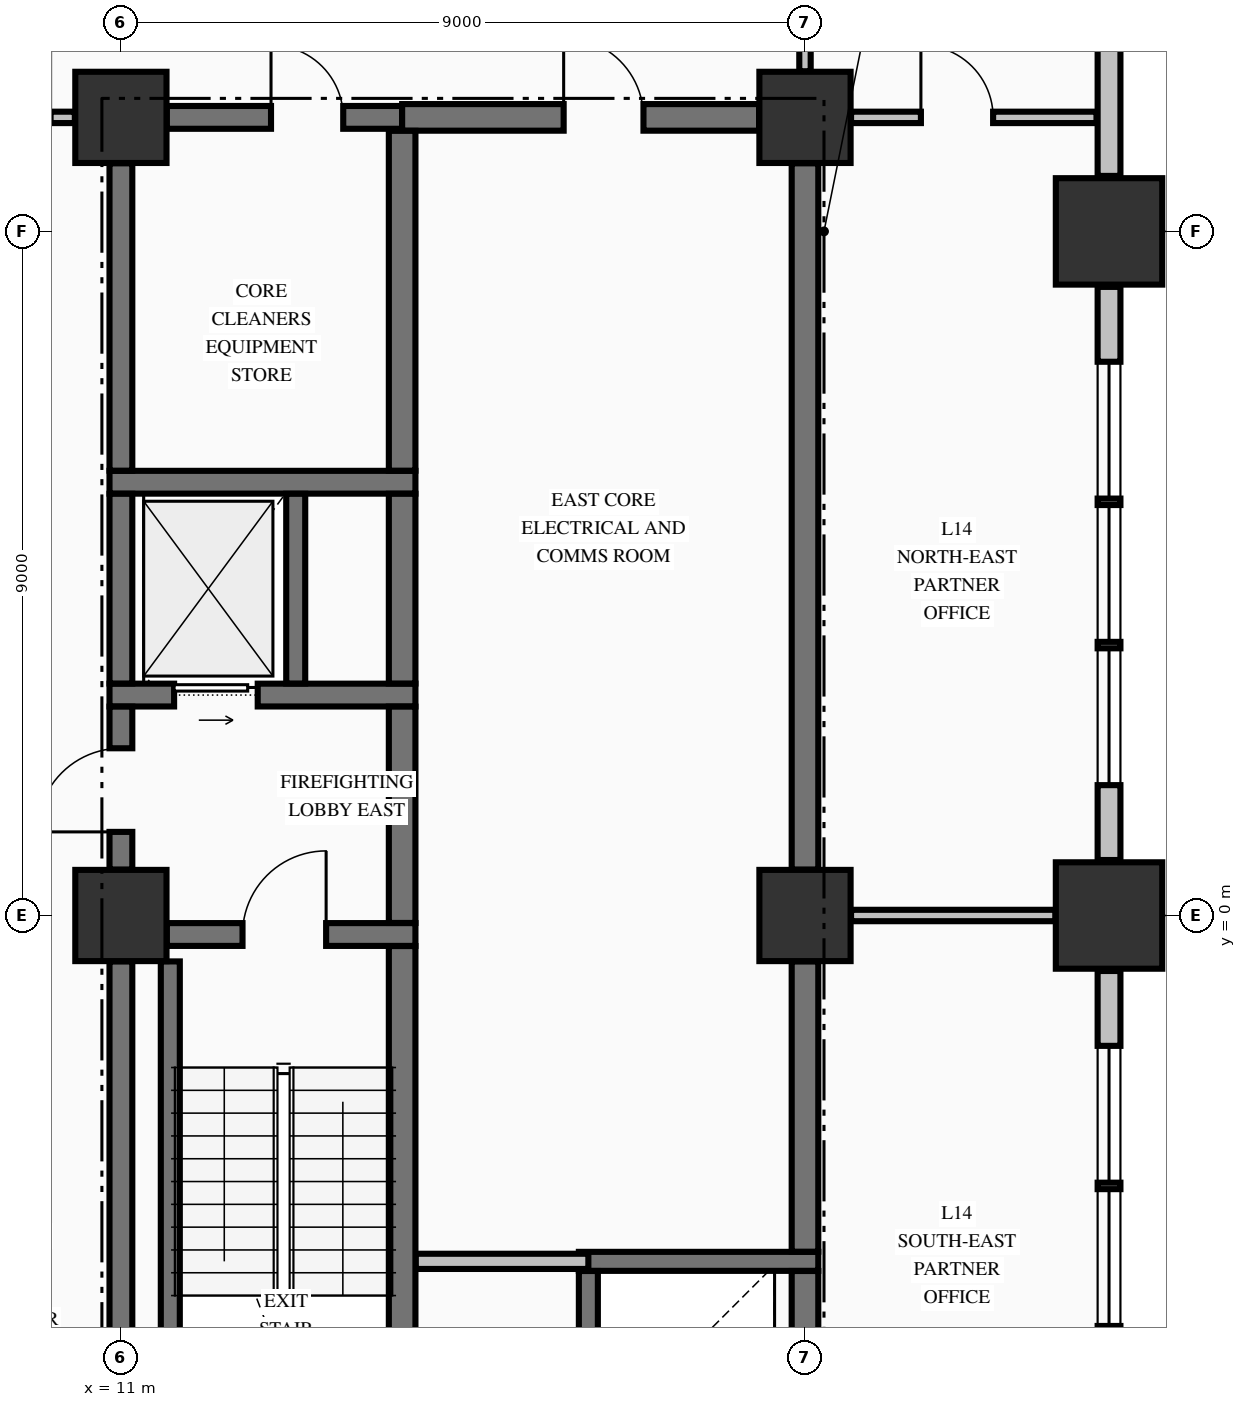
"""IFC4 building model, lengths in metres.
Left out: names, types, materials, properties, quantities, classifications, styles, units other than length and angle.
Written with IfcOpenShell. Run it as: python <this file> out.ifc"""

import sys

from ifc_helpers import new_model, si_unit, direction, frame, frame_2d, origin, origin_2d, place, context, subcontext, project, spatial, rectangle, extrude, element, fill, save


model = new_model("IFC4")
c1 = context("Model", 3, precision=1e-05, world=origin(), true_north=direction((0.0, 1.0)))
c2 = subcontext(c1, "Body", "Model", "MODEL_VIEW")
j1 = project(units=[si_unit("LENGTHUNIT", "METRE"), si_unit("PLANEANGLEUNIT", "RADIAN")], contexts=[c1])
p1 = place(None, origin())
s1 = spatial("IfcSite", under=j1, at=p1, CompositionType="ELEMENT")
p2 = place(p1, origin())
s2 = spatial("IfcBuilding", under=s1, at=p2, CompositionType="ELEMENT")
p3 = place(p2, frame((0.0, 0.0, 60.76)))
s3 = spatial("IfcBuildingStorey", under=s2, at=p3, CompositionType="ELEMENT", Elevation=60.76)
for number, where, z_axis, x_axis in (
    (1, (24.0, 0.0, -0.3), (0.0, 0.0, 1.0), (1.0, 0.0, 0.0)),
    (2, (24.0, 9.0, -0.3), (0.0, 0.0, 1.0), (1.0, 0.0, 0.0)),
):
    element("IfcColumn", number, at=place(p3, frame(where, z_axis=z_axis, x_axis=x_axis)), inside=s3, PredefinedType="COLUMN", context=c2, shape_type="SweptSolid", body=[
        extrude(rectangle(XDim=1.4, YDim=1.4, at=origin_2d()), origin(), (0.0, 0.0, 1.0), 3.62),
    ])
for number, where, z_axis, x_axis in (
    (3, (11.0, 0.0, -0.3), (0.0, 0.0, 1.0), (1.0, 0.0, 0.0)),
    (4, (11.0, 10.5, -0.3), (0.0, 0.0, 1.0), (1.0, 0.0, 0.0)),
    (5, (20.0, 10.5, -0.3), (0.0, 0.0, 1.0), (1.0, 0.0, 0.0)),
    (6, (20.0, 0.0, -0.3), (0.0, 0.0, 1.0), (1.0, 0.0, 0.0)),
):
    element("IfcColumn", number, at=place(p3, frame(where, z_axis=z_axis, x_axis=x_axis)), inside=s3, PredefinedType="COLUMN", context=c2, shape_type="SweptSolid", body=[
        extrude(rectangle(XDim=1.2, YDim=1.2, at=origin_2d()), origin(), (0.0, 0.0, 1.0), 3.62),
    ])
p4 = place(p3, frame((24.0, -8.27, 0.0), z_axis=(0.0, 0.0, 1.0), x_axis=(0.0, 1.0, 0.0)))
e7 = element("IfcWall", 7, at=p4, inside=s3, PredefinedType="STANDARD", context=c2, shape_type="SweptSolid", body=[
    extrude(rectangle(XDim=7.54, YDim=0.3, at=frame_2d((3.77, 0.0))), origin(), (0.0, 0.0, 1.0), 2.712),
])
p5 = place(p4, frame((0.985, 0.0, 0.78)))
e8 = element("IfcOpeningElement", 8, at=p5, cuts=e7, PredefinedType="OPENING", context=c2, shape_type="SweptSolid", body=[
    extrude(rectangle(XDim=1.8, YDim=1.72, at=frame_2d((0.9, 0.86))), frame((0.0, 0.16, 0.0), z_axis=(0.0, -1.0, 0.0), x_axis=(1.0, 0.0, 0.0)), (0.0, 0.0, 1.0), 0.32),
])
p6 = place(p4, frame((2.87, 0.0, 0.78)))
e9 = element("IfcOpeningElement", 9, at=p6, cuts=e7, PredefinedType="OPENING", context=c2, shape_type="SweptSolid", body=[
    extrude(rectangle(XDim=1.8, YDim=1.72, at=frame_2d((0.9, 0.86))), frame((0.0, 0.16, 0.0), z_axis=(0.0, -1.0, 0.0), x_axis=(1.0, 0.0, 0.0)), (0.0, 0.0, 1.0), 0.32),
])
p7 = place(p4, frame((4.755, 0.0, 0.78)))
e10 = element("IfcOpeningElement", 10, at=p7, cuts=e7, PredefinedType="OPENING", context=c2, shape_type="SweptSolid", body=[
    extrude(rectangle(XDim=1.8, YDim=1.72, at=frame_2d((0.9, 0.86))), frame((0.0, 0.16, 0.0), z_axis=(0.0, -1.0, 0.0), x_axis=(1.0, 0.0, 0.0)), (0.0, 0.0, 1.0), 0.32),
])
p8 = place(p3, frame((24.0, 0.73, 0.0), z_axis=(0.0, 0.0, 1.0), x_axis=(0.0, 1.0, 0.0)))
e11 = element("IfcWall", 11, at=p8, inside=s3, PredefinedType="STANDARD", context=c2, shape_type="SweptSolid", body=[
    extrude(rectangle(XDim=7.54, YDim=0.3, at=frame_2d((3.77, 0.0))), origin(), (0.0, 0.0, 1.0), 2.712),
])
p9 = place(p8, frame((0.985, 0.0, 0.78)))
e12 = element("IfcOpeningElement", 12, at=p9, cuts=e11, PredefinedType="OPENING", context=c2, shape_type="SweptSolid", body=[
    extrude(rectangle(XDim=1.8, YDim=1.72, at=frame_2d((0.9, 0.86))), frame((0.0, 0.16, 0.0), z_axis=(0.0, -1.0, 0.0), x_axis=(1.0, 0.0, 0.0)), (0.0, 0.0, 1.0), 0.32),
])
p10 = place(p8, frame((2.87, 0.0, 0.78)))
e13 = element("IfcOpeningElement", 13, at=p10, cuts=e11, PredefinedType="OPENING", context=c2, shape_type="SweptSolid", body=[
    extrude(rectangle(XDim=1.8, YDim=1.72, at=frame_2d((0.9, 0.86))), frame((0.0, 0.16, 0.0), z_axis=(0.0, -1.0, 0.0), x_axis=(1.0, 0.0, 0.0)), (0.0, 0.0, 1.0), 0.32),
])
p11 = place(p8, frame((4.755, 0.0, 0.78)))
e14 = element("IfcOpeningElement", 14, at=p11, cuts=e11, PredefinedType="OPENING", context=c2, shape_type="SweptSolid", body=[
    extrude(rectangle(XDim=1.8, YDim=1.72, at=frame_2d((0.9, 0.86))), frame((0.0, 0.16, 0.0), z_axis=(0.0, -1.0, 0.0), x_axis=(1.0, 0.0, 0.0)), (0.0, 0.0, 1.0), 0.32),
])
p12 = place(p3, frame((24.0, 9.73, 0.0), z_axis=(0.0, 0.0, 1.0), x_axis=(0.0, 1.0, 0.0)))
e15 = element("IfcWall", 15, at=p12, inside=s3, PredefinedType="STANDARD", context=c2, shape_type="SweptSolid", body=[
    extrude(rectangle(XDim=12.54, YDim=0.3, at=frame_2d((6.27, 0.0))), origin(), (0.0, 0.0, 1.0), 2.712),
])
p13 = place(p3, frame((17.025, -4.55, 0.0), z_axis=(0.0, 0.0, 1.0), x_axis=(1.0, 0.0, 0.0)))
e16 = element("IfcWall", 16, at=p13, inside=s3, PredefinedType="SOLIDWALL", context=c2, shape_type="SweptSolid", body=[
    extrude(rectangle(XDim=3.15, YDim=0.25, at=frame_2d((1.575, 0.0))), origin(), (0.0, 0.0, 1.0), 3.32),
])
p14 = place(p3, frame((11.604, -0.25, 0.0), z_axis=(0.0, 0.0, 1.0), x_axis=(1.0, 0.0, 0.0)))
e17 = element("IfcWall", 17, at=p14, inside=s3, PredefinedType="SHEAR", context=c2, shape_type="SweptSolid", body=[
    extrude(rectangle(XDim=3.271, YDim=0.3, at=frame_2d((1.635, 0.0))), origin(), (0.0, 0.0, 1.0), 3.32),
])
p15 = place(p14, frame((0.996, 0.0, 0.0)))
e18 = element("IfcOpeningElement", 18, at=p15, cuts=e17, PredefinedType="OPENING", context=c2, shape_type="SweptSolid", body=[
    extrude(rectangle(XDim=1.1, YDim=2.15, at=frame_2d((0.55, 1.075))), frame((0.0, 0.16, 0.0), z_axis=(0.0, -1.0, 0.0), x_axis=(1.0, 0.0, 0.0)), (0.0, 0.0, 1.0), 0.32),
])
p16 = place(p3, frame((10.85, 2.9, 0.0), z_axis=(0.0, 0.0, 1.0), x_axis=(1.0, 0.0, 0.0)))
e19 = element("IfcWall", 19, at=p16, inside=s3, PredefinedType="SHEAR", context=c2, shape_type="SweptSolid", body=[
    extrude(rectangle(XDim=4.025, YDim=0.3, at=frame_2d((2.012, 0.0))), origin(), (0.0, 0.0, 1.0), 3.32),
])
p17 = place(p16, frame((0.85, 0.0, 0.0)))
e20 = element("IfcOpeningElement", 20, at=p17, cuts=e19, PredefinedType="OPENING", context=c2, shape_type="SweptSolid", body=[
    extrude(rectangle(XDim=1.1, YDim=2.2, at=frame_2d((0.55, 1.1))), frame((0.0, 0.16, 0.0), z_axis=(0.0, -1.0, 0.0), x_axis=(1.0, 0.0, 0.0)), (0.0, 0.0, 1.0), 0.32),
])
p18 = place(p3, frame((10.85, 5.7, 0.0), z_axis=(0.0, 0.0, 1.0), x_axis=(1.0, 0.0, 0.0)))
e21 = element("IfcWall", 21, at=p18, inside=s3, PredefinedType="SHEAR", context=c2, shape_type="SweptSolid", body=[
    extrude(rectangle(XDim=4.025, YDim=0.3, at=frame_2d((2.012, 0.0))), origin(), (0.0, 0.0, 1.0), 3.32),
])
p19 = place(p3, frame((11.604, 10.5, 0.0), z_axis=(0.0, 0.0, 1.0), x_axis=(1.0, 0.0, 0.0)))
e22 = element("IfcWall", 22, at=p19, inside=s3, PredefinedType="SHEAR", context=c2, shape_type="SweptSolid", body=[
    extrude(rectangle(XDim=3.096, YDim=0.3, at=frame_2d((1.548, 0.0))), origin(), (0.0, 0.0, 1.0), 3.32),
])
p20 = place(p19, frame((1.371, 0.0, 0.0)))
e23 = element("IfcOpeningElement", 23, at=p20, cuts=e22, PredefinedType="OPENING", context=c2, shape_type="SweptSolid", body=[
    extrude(rectangle(XDim=0.95, YDim=2.15, at=frame_2d((0.475, 1.075))), frame((0.0, 0.16, 0.0), z_axis=(0.0, -1.0, 0.0), x_axis=(1.0, 0.0, 0.0)), (0.0, 0.0, 1.0), 0.32),
])
p21 = place(p3, frame((14.7, 10.5, 0.0), z_axis=(0.0, 0.0, 1.0), x_axis=(1.0, 0.0, 0.0)))
e24 = element("IfcWall", 24, at=p21, inside=s3, PredefinedType="SHEAR", context=c2, shape_type="SweptSolid", body=[
    extrude(rectangle(XDim=4.696, YDim=0.35, at=frame_2d((2.348, 0.0))), origin(), (0.0, 0.0, 1.0), 3.32),
])
p22 = place(p21, frame((2.125, 0.0, 0.0)))
e25 = element("IfcOpeningElement", 25, at=p22, cuts=e24, PredefinedType="OPENING", context=c2, shape_type="SweptSolid", body=[
    extrude(rectangle(XDim=1.05, YDim=2.15, at=frame_2d((0.525, 1.075))), frame((0.0, 0.185, 0.0), z_axis=(0.0, -1.0, 0.0), x_axis=(1.0, 0.0, 0.0)), (0.0, 0.0, 1.0), 0.37),
])
p23 = place(p3, frame((14.878, -4.55, 0.0), z_axis=(0.0, 0.0, 1.0), x_axis=(1.0, 0.0, 0.0)))
e26 = element("IfcWall", 26, at=p23, inside=s3, PredefinedType="PARTITIONING", context=c2, shape_type="SweptSolid", body=[
    extrude(rectangle(XDim=2.272, YDim=0.2, at=frame_2d((1.136, 0.0))), origin(), (0.0, 0.0, 1.0), 3.32),
])
p24 = place(p3, frame((20.606, 0.0, 0.0), z_axis=(0.0, 0.0, 1.0), x_axis=(1.0, 0.0, 0.0)))
e27 = element("IfcWall", 27, at=p24, inside=s3, PredefinedType="PARTITIONING", context=c2, shape_type="SweptSolid", body=[
    extrude(rectangle(XDim=2.688, YDim=0.15, at=frame_2d((1.344, 0.0))), origin(), (0.0, 0.0, 1.0), 1.512),
])
p25 = place(p3, frame((-10.394, 10.5, 0.0), z_axis=(0.0, 0.0, 1.0), x_axis=(1.0, 0.0, 0.0)))
e28 = element("IfcWall", 28, at=p25, inside=s3, PredefinedType="PARTITIONING", context=c2, shape_type="SweptSolid", body=[
    extrude(rectangle(XDim=20.788, YDim=0.15, at=frame_2d((10.394, 0.0))), origin(), (0.0, 0.0, 1.0), 3.32),
])
p26 = place(p25, frame((0.319, 0.0, 0.0)))
e29 = element("IfcOpeningElement", 29, at=p26, cuts=e28, PredefinedType="OPENING", context=c2, shape_type="SweptSolid", body=[
    extrude(rectangle(XDim=1.05, YDim=2.15, at=frame_2d((0.525, 1.075))), frame((0.0, 0.085, 0.0), z_axis=(0.0, -1.0, 0.0), x_axis=(1.0, 0.0, 0.0)), (0.0, 0.0, 1.0), 0.17),
])
p27 = place(p25, frame((19.419, 0.0, 0.0)))
e30 = element("IfcOpeningElement", 30, at=p27, cuts=e28, PredefinedType="OPENING", context=c2, shape_type="SweptSolid", body=[
    extrude(rectangle(XDim=1.05, YDim=2.15, at=frame_2d((0.525, 1.075))), frame((0.0, 0.085, 0.0), z_axis=(0.0, -1.0, 0.0), x_axis=(1.0, 0.0, 0.0)), (0.0, 0.0, 1.0), 0.17),
])
p28 = place(p3, frame((20.606, 10.5, 0.0), z_axis=(0.0, 0.0, 1.0), x_axis=(1.0, 0.0, 0.0)))
e31 = element("IfcWall", 31, at=p28, inside=s3, PredefinedType="PARTITIONING", context=c2, shape_type="SweptSolid", body=[
    extrude(rectangle(XDim=3.229, YDim=0.15, at=frame_2d((1.615, 0.0))), origin(), (0.0, 0.0, 1.0), 3.32),
])
p29 = place(p28, frame((0.919, 0.0, 0.0)))
e32 = element("IfcOpeningElement", 32, at=p29, cuts=e31, PredefinedType="OPENING", context=c2, shape_type="SweptSolid", body=[
    extrude(rectangle(XDim=0.95, YDim=2.15, at=frame_2d((0.475, 1.075))), frame((0.0, 0.085, 0.0), z_axis=(0.0, -1.0, 0.0), x_axis=(1.0, 0.0, 0.0)), (0.0, 0.0, 1.0), 0.17),
])
p30 = place(p3, frame((11.0, -9.346, 0.0), z_axis=(0.0, 0.0, 1.0), x_axis=(0.0, 1.0, 0.0)))
e33 = element("IfcWall", 33, at=p30, inside=s3, PredefinedType="SHEAR", context=c2, shape_type="SweptSolid", body=[
    extrude(rectangle(XDim=8.742, YDim=0.3, at=frame_2d((4.371, 0.0))), origin(), (0.0, 0.0, 1.0), 3.32),
])
p31 = place(p3, frame((11.0, 0.604, 0.0), z_axis=(0.0, 0.0, 1.0), x_axis=(0.0, 1.0, 0.0)))
e34 = element("IfcWall", 34, at=p31, inside=s3, PredefinedType="SHEAR", context=c2, shape_type="SweptSolid", body=[
    extrude(rectangle(XDim=2.144, YDim=0.3, at=frame_2d((1.072, 0.0))), origin(), (0.0, 0.0, 1.0), 3.32),
])
p32 = place(p31, frame((0.496, 0.0, 0.0)))
e35 = element("IfcOpeningElement", 35, at=p32, cuts=e34, PredefinedType="OPENING", context=c2, shape_type="SweptSolid", body=[
    extrude(rectangle(XDim=1.1, YDim=2.15, at=frame_2d((0.55, 1.075))), frame((0.0, 0.16, 0.0), z_axis=(0.0, -1.0, 0.0), x_axis=(1.0, 0.0, 0.0)), (0.0, 0.0, 1.0), 0.32),
])
p33 = place(p3, frame((11.0, 3.052, 0.0), z_axis=(0.0, 0.0, 1.0), x_axis=(0.0, 1.0, 0.0)))
e36 = element("IfcWall", 36, at=p33, inside=s3, PredefinedType="SHEAR", context=c2, shape_type="SweptSolid", body=[
    extrude(rectangle(XDim=2.496, YDim=0.3, at=frame_2d((1.248, 0.0))), origin(), (0.0, 0.0, 1.0), 3.32),
])
p34 = place(p3, frame((11.0, 5.852, 0.0), z_axis=(0.0, 0.0, 1.0), x_axis=(0.0, 1.0, 0.0)))
e37 = element("IfcWall", 37, at=p34, inside=s3, PredefinedType="SHEAR", context=c2, shape_type="SweptSolid", body=[
    extrude(rectangle(XDim=4.044, YDim=0.3, at=frame_2d((2.022, 0.0))), origin(), (0.0, 0.0, 1.0), 3.32),
])
p35 = place(p3, frame((11.65, -9.346, 0.0), z_axis=(0.0, 0.0, 1.0), x_axis=(0.0, 1.0, 0.0)))
e38 = element("IfcWall", 38, at=p35, inside=s3, PredefinedType="SOLIDWALL", context=c2, shape_type="SweptSolid", body=[
    extrude(rectangle(XDim=8.742, YDim=0.25, at=frame_2d((4.371, 0.0))), origin(), (0.0, 0.0, 1.0), 3.32),
])
p36 = place(p3, frame((13.3, 3.052, 0.0), z_axis=(0.0, 0.0, 1.0), x_axis=(0.0, 1.0, 0.0)))
e39 = element("IfcWall", 39, at=p36, inside=s3, PredefinedType="SOLIDWALL", context=c2, shape_type="SweptSolid", body=[
    extrude(rectangle(XDim=2.496, YDim=0.25, at=frame_2d((1.248, 0.0))), origin(), (0.0, 0.0, 1.0), 3.32),
])
p37 = place(p3, frame((14.7, -9.773, 0.0), z_axis=(0.0, 0.0, 1.0), x_axis=(0.0, 1.0, 0.0)))
e40 = element("IfcWall", 40, at=p37, inside=s3, PredefinedType="SHEAR", context=c2, shape_type="SweptSolid", body=[
    extrude(rectangle(XDim=9.371, YDim=0.35, at=frame_2d((4.686, 0.0))), origin(), (0.0, 0.0, 1.0), 3.32),
])
p38 = place(p3, frame((14.7, -0.098, 0.0), z_axis=(0.0, 0.0, 1.0), x_axis=(0.0, 1.0, 0.0)))
e41 = element("IfcWall", 41, at=p38, inside=s3, PredefinedType="SHEAR", context=c2, shape_type="SweptSolid", body=[
    extrude(rectangle(XDim=2.846, YDim=0.35, at=frame_2d((1.423, 0.0))), origin(), (0.0, 0.0, 1.0), 3.32),
])
p39 = place(p3, frame((14.7, 3.052, 0.0), z_axis=(0.0, 0.0, 1.0), x_axis=(0.0, 1.0, 0.0)))
e42 = element("IfcWall", 42, at=p39, inside=s3, PredefinedType="SHEAR", context=c2, shape_type="SweptSolid", body=[
    extrude(rectangle(XDim=2.496, YDim=0.35, at=frame_2d((1.248, 0.0))), origin(), (0.0, 0.0, 1.0), 3.32),
])
p40 = place(p3, frame((14.7, 5.852, 0.0), z_axis=(0.0, 0.0, 1.0), x_axis=(0.0, 1.0, 0.0)))
e43 = element("IfcWall", 43, at=p40, inside=s3, PredefinedType="SHEAR", context=c2, shape_type="SweptSolid", body=[
    extrude(rectangle(XDim=4.471, YDim=0.35, at=frame_2d((2.235, 0.0))), origin(), (0.0, 0.0, 1.0), 3.32),
])
p41 = place(p3, frame((17.15, -6.923, 0.0), z_axis=(0.0, 0.0, 1.0), x_axis=(0.0, 1.0, 0.0)))
e44 = element("IfcWall", 44, at=p41, inside=s3, PredefinedType="SOLIDWALL", context=c2, shape_type="SweptSolid", body=[
    extrude(rectangle(XDim=2.246, YDim=0.25, at=frame_2d((1.123, 0.0))), origin(), (0.0, 0.0, 1.0), 3.32),
])
p42 = place(p3, frame((20.0, -6.923, 0.0), z_axis=(0.0, 0.0, 1.0), x_axis=(0.0, 1.0, 0.0)))
e45 = element("IfcWall", 45, at=p42, inside=s3, PredefinedType="SHEAR", context=c2, shape_type="SweptSolid", body=[
    extrude(rectangle(XDim=2.246, YDim=0.35, at=frame_2d((1.123, 0.0))), origin(), (0.0, 0.0, 1.0), 3.32),
])
p43 = place(p3, frame((20.0, -4.423, 0.0), z_axis=(0.0, 0.0, 1.0), x_axis=(0.0, 1.0, 0.0)))
e46 = element("IfcWall", 46, at=p43, inside=s3, PredefinedType="SHEAR", context=c2, shape_type="SweptSolid", body=[
    extrude(rectangle(XDim=3.819, YDim=0.35, at=frame_2d((1.91, 0.0))), origin(), (0.0, 0.0, 1.0), 3.32),
])
p44 = place(p3, frame((20.0, 0.604, 0.0), z_axis=(0.0, 0.0, 1.0), x_axis=(0.0, 1.0, 0.0)))
e47 = element("IfcWall", 47, at=p44, inside=s3, PredefinedType="SHEAR", context=c2, shape_type="SweptSolid", body=[
    extrude(rectangle(XDim=9.292, YDim=0.35, at=frame_2d((4.646, 0.0))), origin(), (0.0, 0.0, 1.0), 3.32),
])
p45 = place(p3, frame((20.0, 11.106, 0.0), z_axis=(0.0, 0.0, 1.0), x_axis=(0.0, 1.0, 0.0)))
e48 = element("IfcWall", 48, at=p45, inside=s3, PredefinedType="PARTITIONING", context=c2, shape_type="SweptSolid", body=[
    extrude(rectangle(XDim=2.366, YDim=0.15, at=frame_2d((1.183, 0.0))), origin(), (0.0, 0.0, 1.0), 3.32),
])
p46 = place(p45, frame((0.449, 0.0, 0.0)))
e49 = element("IfcOpeningElement", 49, at=p46, cuts=e48, PredefinedType="OPENING", context=c2, shape_type="SweptSolid", body=[
    extrude(rectangle(XDim=0.95, YDim=2.15, at=frame_2d((0.475, 1.075))), frame((0.0, 0.085, 0.0), z_axis=(0.0, -1.0, 0.0), x_axis=(1.0, 0.0, 0.0)), (0.0, 0.0, 1.0), 0.17),
])
p47 = place(p6, origin())
e50 = element("IfcWindow", 50, at=p47, inside=s3, PartitioningType="SINGLE_PANEL", PredefinedType="WINDOW", context=c2, shape_type="SweptSolid", body=[
    extrude(rectangle(XDim=1.8, YDim=1.72, at=frame_2d((0.9, 0.86))), frame((0.0, 0.03, 0.0), z_axis=(0.0, -1.0, 0.0), x_axis=(1.0, 0.0, 0.0)), (0.0, 0.0, 1.0), 0.06),
])
fill(e9, e50)
p48 = place(p7, origin())
e51 = element("IfcWindow", 51, at=p48, inside=s3, PartitioningType="SINGLE_PANEL", PredefinedType="WINDOW", context=c2, shape_type="SweptSolid", body=[
    extrude(rectangle(XDim=1.8, YDim=1.72, at=frame_2d((0.9, 0.86))), frame((0.0, 0.03, 0.0), z_axis=(0.0, -1.0, 0.0), x_axis=(1.0, 0.0, 0.0)), (0.0, 0.0, 1.0), 0.06),
])
fill(e10, e51)
p49 = place(p9, origin())
e52 = element("IfcWindow", 52, at=p49, inside=s3, PartitioningType="SINGLE_PANEL", PredefinedType="WINDOW", context=c2, shape_type="SweptSolid", body=[
    extrude(rectangle(XDim=1.8, YDim=1.72, at=frame_2d((0.9, 0.86))), frame((0.0, 0.03, 0.0), z_axis=(0.0, -1.0, 0.0), x_axis=(1.0, 0.0, 0.0)), (0.0, 0.0, 1.0), 0.06),
])
fill(e12, e52)
p50 = place(p10, origin())
e53 = element("IfcWindow", 53, at=p50, inside=s3, PartitioningType="SINGLE_PANEL", PredefinedType="WINDOW", context=c2, shape_type="SweptSolid", body=[
    extrude(rectangle(XDim=1.8, YDim=1.72, at=frame_2d((0.9, 0.86))), frame((0.0, 0.03, 0.0), z_axis=(0.0, -1.0, 0.0), x_axis=(1.0, 0.0, 0.0)), (0.0, 0.0, 1.0), 0.06),
])
fill(e13, e53)
p51 = place(p11, origin())
e54 = element("IfcWindow", 54, at=p51, inside=s3, PartitioningType="SINGLE_PANEL", PredefinedType="WINDOW", context=c2, shape_type="SweptSolid", body=[
    extrude(rectangle(XDim=1.8, YDim=1.72, at=frame_2d((0.9, 0.86))), frame((0.0, 0.03, 0.0), z_axis=(0.0, -1.0, 0.0), x_axis=(1.0, 0.0, 0.0)), (0.0, 0.0, 1.0), 0.06),
])
fill(e14, e54)
p52 = place(p15, origin())
e55 = element("IfcDoor", 55, at=p52, inside=s3, OperationType="SINGLE_SWING_RIGHT", PredefinedType="DOOR", context=c2, shape_type="SweptSolid", body=[
    extrude(rectangle(XDim=1.1, YDim=2.15, at=frame_2d((0.55, 1.075))), frame((0.0, 0.025, 0.0), z_axis=(0.0, -1.0, 0.0), x_axis=(1.0, 0.0, 0.0)), (0.0, 0.0, 1.0), 0.05),
])
fill(e18, e55)
p53 = place(p32, origin())
e56 = element("IfcDoor", 56, at=p53, inside=s3, OperationType="SINGLE_SWING_LEFT", PredefinedType="DOOR", context=c2, shape_type="SweptSolid", body=[
    extrude(rectangle(XDim=1.1, YDim=2.15, at=frame_2d((0.55, 1.075))), frame((0.0, 0.025, 0.0), z_axis=(0.0, -1.0, 0.0), x_axis=(1.0, 0.0, 0.0)), (0.0, 0.0, 1.0), 0.05),
])
fill(e35, e56)
p54 = place(p17, origin())
e57 = element("IfcDoor", 57, at=p54, inside=s3, OperationType="SLIDING_TO_RIGHT", PredefinedType="DOOR", context=c2, shape_type="SweptSolid", body=[
    extrude(rectangle(XDim=1.1, YDim=2.2, at=frame_2d((0.55, 1.1))), frame((0.0, 0.025, 0.0), z_axis=(0.0, -1.0, 0.0), x_axis=(1.0, 0.0, 0.0)), (0.0, 0.0, 1.0), 0.05),
])
fill(e20, e57)
p55 = place(p20, origin())
e58 = element("IfcDoor", 58, at=p55, inside=s3, OperationType="SINGLE_SWING_LEFT", PredefinedType="DOOR", context=c2, shape_type="SweptSolid", body=[
    extrude(rectangle(XDim=0.95, YDim=2.15, at=frame_2d((0.475, 1.075))), frame((0.0, 0.025, 0.0), z_axis=(0.0, -1.0, 0.0), x_axis=(1.0, 0.0, 0.0)), (0.0, 0.0, 1.0), 0.05),
])
fill(e23, e58)
p56 = place(p22, origin())
e59 = element("IfcDoor", 59, at=p56, inside=s3, OperationType="SINGLE_SWING_LEFT", PredefinedType="DOOR", context=c2, shape_type="SweptSolid", body=[
    extrude(rectangle(XDim=1.05, YDim=2.15, at=frame_2d((0.525, 1.075))), frame((0.0, 0.025, 0.0), z_axis=(0.0, -1.0, 0.0), x_axis=(1.0, 0.0, 0.0)), (0.0, 0.0, 1.0), 0.05),
])
fill(e25, e59)
p57 = place(p29, origin())
e60 = element("IfcDoor", 60, at=p57, inside=s3, OperationType="SINGLE_SWING_LEFT", PredefinedType="DOOR", context=c2, shape_type="SweptSolid", body=[
    extrude(rectangle(XDim=0.95, YDim=2.15, at=frame_2d((0.475, 1.075))), frame((0.0, 0.025, 0.0), z_axis=(0.0, -1.0, 0.0), x_axis=(1.0, 0.0, 0.0)), (0.0, 0.0, 1.0), 0.05),
])
fill(e32, e60)
save(model, sys.argv[1])
